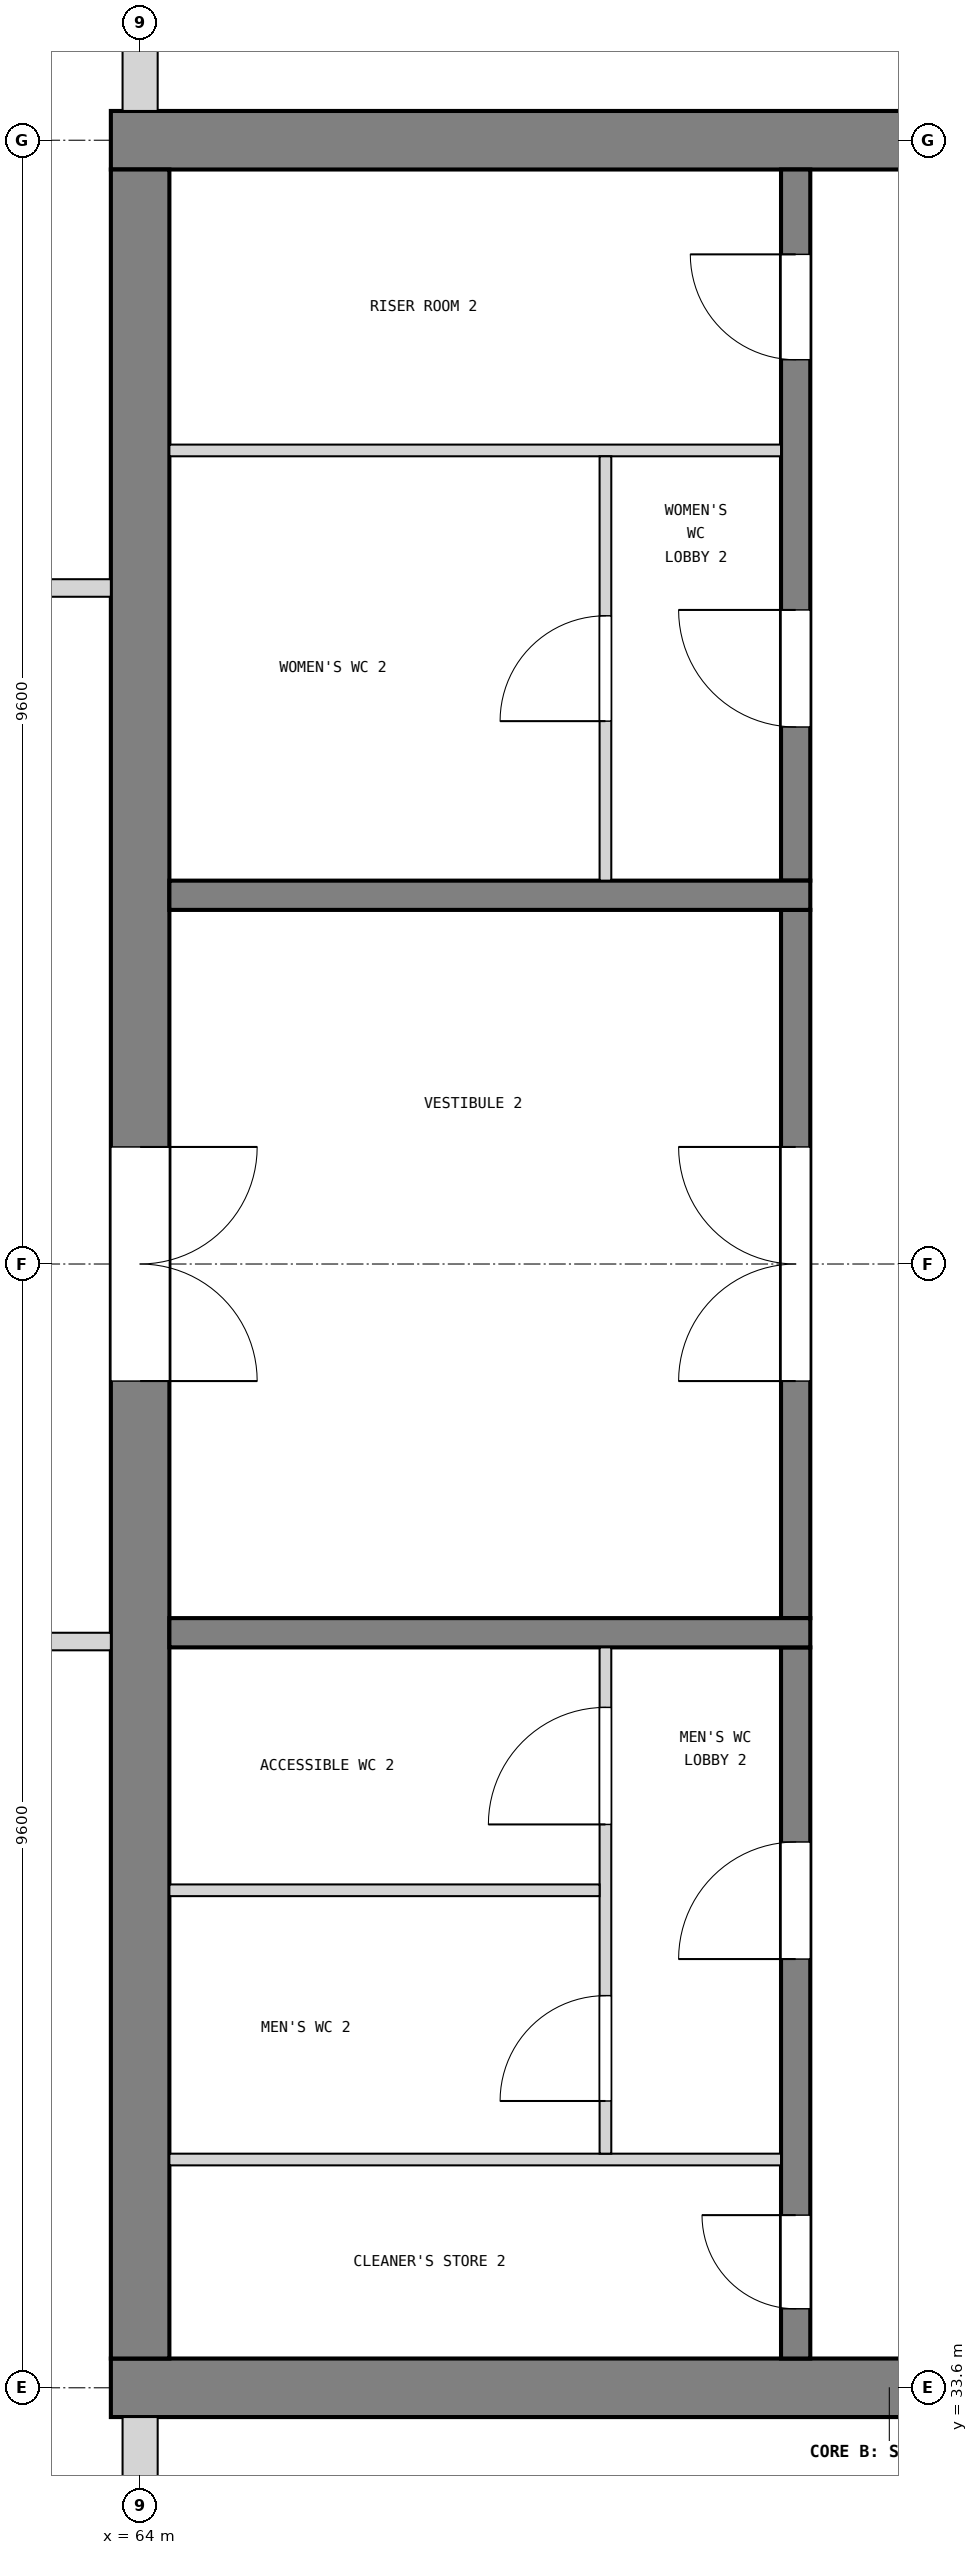
"""IFC4 building model, lengths in metres.
Left out: names, types, materials, properties, quantities, classifications, styles, units other than length and angle.
Written with IfcOpenShell. Run it as: python <this file> out.ifc"""

import sys

from ifc_helpers import new_model, si_unit, direction, frame, frame_2d, origin, place, context, subcontext, project, spatial, rectangle, extrude, element, fill, save


model = new_model("IFC4")
c1 = context("Model", 3, precision=1e-05, world=origin(), true_north=direction((0.0, 1.0)))
c2 = subcontext(c1, "Body", "Model", "MODEL_VIEW")
j1 = project(units=[si_unit("LENGTHUNIT", "METRE"), si_unit("PLANEANGLEUNIT", "RADIAN")], contexts=[c1])
p1 = place(None, origin())
s1 = spatial("IfcSite", under=j1, at=p1, CompositionType="ELEMENT")
p2 = place(p1, origin())
s2 = spatial("IfcBuilding", under=s1, at=p2, CompositionType="ELEMENT")
p3 = place(p2, frame((0.0, 0.0, 44.4)))
s3 = spatial("IfcBuildingStorey", under=s2, at=p3, CompositionType="ELEMENT", Elevation=44.4)
p4 = place(p3, frame((63.75, 52.8, 0.0), z_axis=(0.0, 0.0, 1.0), x_axis=(1.0, 0.0, 0.0)))
e1 = element("IfcWall", 1, at=p4, inside=s3, PredefinedType="SHEAR", context=c2, shape_type="SweptSolid", body=[
    extrude(rectangle(XDim=13.3, YDim=0.5, at=frame_2d((6.65, 0.0))), origin(), (0.0, 0.0, 1.0), 3.9),
])
p5 = place(p4, frame((11.05, 0.0, 1.0)))
e2 = element("IfcOpeningElement", 2, at=p5, cuts=e1, PredefinedType="OPENING", context=c2, shape_type="SweptSolid", body=[
    extrude(rectangle(XDim=0.4, YDim=2.0, at=frame_2d((0.2, 1.0))), frame((0.0, 0.26, 0.0), z_axis=(0.0, -1.0, 0.0), x_axis=(1.0, 0.0, 0.0)), (0.0, 0.0, 1.0), 0.52),
])
p6 = place(p3, frame((63.75, 33.6, 0.0), z_axis=(0.0, 0.0, 1.0), x_axis=(1.0, 0.0, 0.0)))
e3 = element("IfcWall", 3, at=p6, inside=s3, PredefinedType="SHEAR", context=c2, shape_type="SweptSolid", body=[
    extrude(rectangle(XDim=13.3, YDim=0.5, at=frame_2d((6.65, 0.0))), origin(), (0.0, 0.0, 1.0), 3.9),
])
p7 = place(p6, frame((11.05, 0.0, 1.0)))
e4 = element("IfcOpeningElement", 4, at=p7, cuts=e3, PredefinedType="OPENING", context=c2, shape_type="SweptSolid", body=[
    extrude(rectangle(XDim=0.4, YDim=2.0, at=frame_2d((0.2, 1.0))), frame((0.0, 0.26, 0.0), z_axis=(0.0, -1.0, 0.0), x_axis=(1.0, 0.0, 0.0)), (0.0, 0.0, 1.0), 0.52),
])
p8 = place(p3, frame((64.0, 33.85, 0.0), z_axis=(0.0, 0.0, 1.0), x_axis=(0.0, 1.0, 0.0)))
e5 = element("IfcWall", 5, at=p8, inside=s3, PredefinedType="SHEAR", context=c2, shape_type="SweptSolid", body=[
    extrude(rectangle(XDim=18.7, YDim=0.5, at=frame_2d((9.35, 0.0))), origin(), (0.0, 0.0, 1.0), 3.9),
])
p9 = place(p8, frame((8.35, 0.0, 0.0)))
e6 = element("IfcOpeningElement", 6, at=p9, cuts=e5, PredefinedType="OPENING", context=c2, shape_type="SweptSolid", body=[
    extrude(rectangle(XDim=2.0, YDim=2.1, at=frame_2d((1.0, 1.05))), frame((0.0, 0.26, 0.0), z_axis=(0.0, -1.0, 0.0), x_axis=(1.0, 0.0, 0.0)), (0.0, 0.0, 1.0), 0.52),
])
p10 = place(p3, frame((64.0, 31.0, 0.0), z_axis=(0.0, 0.0, 1.0), x_axis=(0.0, 1.0, 0.0)))
e7 = element("IfcWall", 7, at=p10, inside=s3, PredefinedType="SOLIDWALL", context=c2, shape_type="SweptSolid", body=[
    extrude(rectangle(XDim=2.35, YDim=0.3, at=frame_2d((1.175, 0.0))), origin(), (0.0, 0.0, 1.0), 2.88),
])
p11 = place(p3, frame((64.0, 53.05, 0.0), z_axis=(0.0, 0.0, 1.0), x_axis=(0.0, 1.0, 0.0)))
e8 = element("IfcWall", 8, at=p11, inside=s3, PredefinedType="SOLIDWALL", context=c2, shape_type="SweptSolid", body=[
    extrude(rectangle(XDim=2.35, YDim=0.3, at=frame_2d((1.175, 0.0))), origin(), (0.0, 0.0, 1.0), 2.88),
])
p12 = place(p3, frame((69.6, 33.85, 0.0), z_axis=(0.0, 0.0, 1.0), x_axis=(0.0, 1.0, 0.0)))
e9 = element("IfcWall", 9, at=p12, inside=s3, PredefinedType="SOLIDWALL", context=c2, shape_type="SweptSolid", body=[
    extrude(rectangle(XDim=6.075, YDim=0.25, at=frame_2d((3.038, 0.0))), origin(), (0.0, 0.0, 1.0), 3.6),
])
p13 = place(p12, frame((0.425, 0.0, 0.0)))
e10 = element("IfcOpeningElement", 10, at=p13, cuts=e9, PredefinedType="OPENING", context=c2, shape_type="SweptSolid", body=[
    extrude(rectangle(XDim=0.8, YDim=2.1, at=frame_2d((0.4, 1.05))), frame((0.0, 0.135, 0.0), z_axis=(0.0, -1.0, 0.0), x_axis=(1.0, 0.0, 0.0)), (0.0, 0.0, 1.0), 0.27),
])
p14 = place(p12, frame((3.413, 0.0, 0.0)))
e11 = element("IfcOpeningElement", 11, at=p14, cuts=e9, PredefinedType="OPENING", context=c2, shape_type="SweptSolid", body=[
    extrude(rectangle(XDim=1.0, YDim=2.1, at=frame_2d((0.5, 1.05))), frame((0.0, 0.135, 0.0), z_axis=(0.0, -1.0, 0.0), x_axis=(1.0, 0.0, 0.0)), (0.0, 0.0, 1.0), 0.27),
])
p15 = place(p3, frame((69.6, 40.175, 0.0), z_axis=(0.0, 0.0, 1.0), x_axis=(0.0, 1.0, 0.0)))
e12 = element("IfcWall", 12, at=p15, inside=s3, PredefinedType="SOLIDWALL", context=c2, shape_type="SweptSolid", body=[
    extrude(rectangle(XDim=6.05, YDim=0.25, at=frame_2d((3.025, 0.0))), origin(), (0.0, 0.0, 1.0), 3.6),
])
p16 = place(p15, frame((2.025, 0.0, 0.0)))
e13 = element("IfcOpeningElement", 13, at=p16, cuts=e12, PredefinedType="OPENING", context=c2, shape_type="SweptSolid", body=[
    extrude(rectangle(XDim=2.0, YDim=2.1, at=frame_2d((1.0, 1.05))), frame((0.0, 0.135, 0.0), z_axis=(0.0, -1.0, 0.0), x_axis=(1.0, 0.0, 0.0)), (0.0, 0.0, 1.0), 0.27),
])
p17 = place(p3, frame((69.6, 46.475, 0.0), z_axis=(0.0, 0.0, 1.0), x_axis=(0.0, 1.0, 0.0)))
e14 = element("IfcWall", 14, at=p17, inside=s3, PredefinedType="SOLIDWALL", context=c2, shape_type="SweptSolid", body=[
    extrude(rectangle(XDim=6.075, YDim=0.25, at=frame_2d((3.038, 0.0))), origin(), (0.0, 0.0, 1.0), 3.6),
])
p18 = place(p17, frame((1.312, 0.0, 0.0)))
e15 = element("IfcOpeningElement", 15, at=p18, cuts=e14, PredefinedType="OPENING", context=c2, shape_type="SweptSolid", body=[
    extrude(rectangle(XDim=1.0, YDim=2.1, at=frame_2d((0.5, 1.05))), frame((0.0, 0.135, 0.0), z_axis=(0.0, -1.0, 0.0), x_axis=(1.0, 0.0, 0.0)), (0.0, 0.0, 1.0), 0.27),
])
p19 = place(p17, frame((4.45, 0.0, 0.0)))
e16 = element("IfcOpeningElement", 16, at=p19, cuts=e14, PredefinedType="OPENING", context=c2, shape_type="SweptSolid", body=[
    extrude(rectangle(XDim=0.9, YDim=2.1, at=frame_2d((0.45, 1.05))), frame((0.0, 0.135, 0.0), z_axis=(0.0, -1.0, 0.0), x_axis=(1.0, 0.0, 0.0)), (0.0, 0.0, 1.0), 0.27),
])
for number, where, z_axis, x_axis in (
    (17, (69.725, 40.05, 0.0), (0.0, 0.0, 1.0), (-1.0, 0.0, 0.0)),
    (18, (69.725, 46.35, 0.0), (0.0, 0.0, 1.0), (-1.0, 0.0, 0.0)),
):
    element("IfcWall", number, at=place(p3, frame(where, z_axis=z_axis, x_axis=x_axis)), inside=s3, PredefinedType="SOLIDWALL", context=c2, shape_type="SweptSolid", body=[
        extrude(rectangle(XDim=5.475, YDim=0.25, at=frame_2d((2.738, 0.0))), origin(), (0.0, 0.0, 1.0), 3.6),
    ])
p20 = place(p3, frame((69.475, 35.55, 0.0), z_axis=(0.0, 0.0, 1.0), x_axis=(-1.0, 0.0, 0.0)))
e19 = element("IfcWall", 19, at=p20, inside=s3, PredefinedType="PARTITIONING", context=c2, shape_type="SweptSolid", body=[
    extrude(rectangle(XDim=5.225, YDim=0.1, at=frame_2d((2.613, 0.0))), origin(), (0.0, 0.0, 1.0), 3.6),
])
p21 = place(p3, frame((67.975, 35.6, 0.0), z_axis=(0.0, 0.0, 1.0), x_axis=(0.0, 1.0, 0.0)))
e20 = element("IfcWall", 20, at=p21, inside=s3, PredefinedType="PARTITIONING", context=c2, shape_type="SweptSolid", body=[
    extrude(rectangle(XDim=4.325, YDim=0.1, at=frame_2d((2.163, 0.0))), origin(), (0.0, 0.0, 1.0), 3.6),
])
p22 = place(p21, frame((0.45, 0.0, 0.0)))
e21 = element("IfcOpeningElement", 21, at=p22, cuts=e20, PredefinedType="OPENING", context=c2, shape_type="SweptSolid", body=[
    extrude(rectangle(XDim=0.9, YDim=2.1, at=frame_2d((0.45, 1.05))), frame((0.0, 0.06, 0.0), z_axis=(0.0, -1.0, 0.0), x_axis=(1.0, 0.0, 0.0)), (0.0, 0.0, 1.0), 0.12),
])
p23 = place(p21, frame((2.812, 0.0, 0.0)))
e22 = element("IfcOpeningElement", 22, at=p23, cuts=e20, PredefinedType="OPENING", context=c2, shape_type="SweptSolid", body=[
    extrude(rectangle(XDim=1.0, YDim=2.1, at=frame_2d((0.5, 1.05))), frame((0.0, 0.06, 0.0), z_axis=(0.0, -1.0, 0.0), x_axis=(1.0, 0.0, 0.0)), (0.0, 0.0, 1.0), 0.12),
])
p24 = place(p3, frame((67.925, 37.85, 0.0), z_axis=(0.0, 0.0, 1.0), x_axis=(-1.0, 0.0, 0.0)))
e23 = element("IfcWall", 23, at=p24, inside=s3, PredefinedType="PARTITIONING", context=c2, shape_type="SweptSolid", body=[
    extrude(rectangle(XDim=3.675, YDim=0.1, at=frame_2d((1.837, 0.0))), origin(), (0.0, 0.0, 1.0), 3.6),
])
p25 = place(p3, frame((69.475, 50.15, 0.0), z_axis=(0.0, 0.0, 1.0), x_axis=(-1.0, 0.0, 0.0)))
e24 = element("IfcWall", 24, at=p25, inside=s3, PredefinedType="PARTITIONING", context=c2, shape_type="SweptSolid", body=[
    extrude(rectangle(XDim=5.225, YDim=0.1, at=frame_2d((2.613, 0.0))), origin(), (0.0, 0.0, 1.0), 3.6),
])
p26 = place(p3, frame((67.975, 46.475, 0.0), z_axis=(0.0, 0.0, 1.0), x_axis=(0.0, 1.0, 0.0)))
e25 = element("IfcWall", 25, at=p26, inside=s3, PredefinedType="PARTITIONING", context=c2, shape_type="SweptSolid", body=[
    extrude(rectangle(XDim=3.625, YDim=0.1, at=frame_2d((1.812, 0.0))), origin(), (0.0, 0.0, 1.0), 3.6),
])
p27 = place(p26, frame((1.363, 0.0, 0.0)))
e26 = element("IfcOpeningElement", 26, at=p27, cuts=e25, PredefinedType="OPENING", context=c2, shape_type="SweptSolid", body=[
    extrude(rectangle(XDim=0.9, YDim=2.1, at=frame_2d((0.45, 1.05))), frame((0.0, 0.06, 0.0), z_axis=(0.0, -1.0, 0.0), x_axis=(1.0, 0.0, 0.0)), (0.0, 0.0, 1.0), 0.12),
])
p28 = place(p3, frame((57.78, 48.975, 0.0), z_axis=(0.0, 0.0, 1.0), x_axis=(1.0, 0.0, 0.0)))
e27 = element("IfcWall", 27, at=p28, inside=s3, PredefinedType="PARTITIONING", context=c2, shape_type="SweptSolid", body=[
    extrude(rectangle(XDim=5.97, YDim=0.15, at=frame_2d((2.985, 0.0))), origin(), (0.0, 0.0, 1.0), 3.68),
])
p29 = place(p28, frame((2.52, 0.0, 0.0)))
e28 = element("IfcOpeningElement", 28, at=p29, cuts=e27, PredefinedType="OPENING", context=c2, shape_type="SweptSolid", body=[
    extrude(rectangle(XDim=1.0, YDim=2.1, at=frame_2d((0.5, 1.05))), frame((0.0, 0.085, 0.0), z_axis=(0.0, -1.0, 0.0), x_axis=(1.0, 0.0, 0.0)), (0.0, 0.0, 1.0), 0.17),
])
p30 = place(p3, frame((57.78, 39.975, 0.0), z_axis=(0.0, 0.0, 1.0), x_axis=(1.0, 0.0, 0.0)))
e29 = element("IfcWall", 29, at=p30, inside=s3, PredefinedType="PARTITIONING", context=c2, shape_type="SweptSolid", body=[
    extrude(rectangle(XDim=5.97, YDim=0.15, at=frame_2d((2.985, 0.0))), origin(), (0.0, 0.0, 1.0), 3.68),
])
p31 = place(p30, frame((2.52, 0.0, 0.0)))
e30 = element("IfcOpeningElement", 30, at=p31, cuts=e29, PredefinedType="OPENING", context=c2, shape_type="SweptSolid", body=[
    extrude(rectangle(XDim=1.0, YDim=2.1, at=frame_2d((0.5, 1.05))), frame((0.0, 0.085, 0.0), z_axis=(0.0, -1.0, 0.0), x_axis=(1.0, 0.0, 0.0)), (0.0, 0.0, 1.0), 0.17),
])
p32 = place(p16, origin())
e31 = element("IfcDoor", 31, at=p32, inside=s3, OperationType="DOUBLE_DOOR_SINGLE_SWING", PredefinedType="DOOR", context=c2, shape_type="SweptSolid", body=[
    extrude(rectangle(XDim=2.0, YDim=2.1, at=frame_2d((1.0, 1.05))), frame((0.0, 0.025, 0.0), z_axis=(0.0, -1.0, 0.0), x_axis=(1.0, 0.0, 0.0)), (0.0, 0.0, 1.0), 0.05),
])
fill(e13, e31)
p33 = place(p9, frame((2.0, 0.0, 0.0), z_axis=(0.0, 0.0, 1.0), x_axis=(-1.0, 0.0, 0.0)))
e32 = element("IfcDoor", 32, at=p33, inside=s3, OperationType="DOUBLE_DOOR_SINGLE_SWING", PredefinedType="DOOR", context=c2, shape_type="SweptSolid", body=[
    extrude(rectangle(XDim=2.0, YDim=2.1, at=frame_2d((1.0, 1.05))), frame((0.0, 0.025, 0.0), z_axis=(0.0, -1.0, 0.0), x_axis=(1.0, 0.0, 0.0)), (0.0, 0.0, 1.0), 0.05),
])
fill(e6, e32)
p34 = place(p13, origin())
e33 = element("IfcDoor", 33, at=p34, inside=s3, OperationType="SINGLE_SWING_RIGHT", PredefinedType="DOOR", context=c2, shape_type="SweptSolid", body=[
    extrude(rectangle(XDim=0.8, YDim=2.1, at=frame_2d((0.4, 1.05))), frame((0.0, 0.025, 0.0), z_axis=(0.0, -1.0, 0.0), x_axis=(1.0, 0.0, 0.0)), (0.0, 0.0, 1.0), 0.05),
])
fill(e10, e33)
p35 = place(p14, origin())
e34 = element("IfcDoor", 34, at=p35, inside=s3, OperationType="SINGLE_SWING_LEFT", PredefinedType="DOOR", context=c2, shape_type="SweptSolid", body=[
    extrude(rectangle(XDim=1.0, YDim=2.1, at=frame_2d((0.5, 1.05))), frame((0.0, 0.025, 0.0), z_axis=(0.0, -1.0, 0.0), x_axis=(1.0, 0.0, 0.0)), (0.0, 0.0, 1.0), 0.05),
])
fill(e11, e34)
p36 = place(p22, origin())
e35 = element("IfcDoor", 35, at=p36, inside=s3, OperationType="SINGLE_SWING_LEFT", PredefinedType="DOOR", context=c2, shape_type="SweptSolid", body=[
    extrude(rectangle(XDim=0.9, YDim=2.1, at=frame_2d((0.45, 1.05))), frame((0.0, 0.025, 0.0), z_axis=(0.0, -1.0, 0.0), x_axis=(1.0, 0.0, 0.0)), (0.0, 0.0, 1.0), 0.05),
])
fill(e21, e35)
p37 = place(p23, origin())
e36 = element("IfcDoor", 36, at=p37, inside=s3, OperationType="SINGLE_SWING_LEFT", PredefinedType="DOOR", context=c2, shape_type="SweptSolid", body=[
    extrude(rectangle(XDim=1.0, YDim=2.1, at=frame_2d((0.5, 1.05))), frame((0.0, 0.025, 0.0), z_axis=(0.0, -1.0, 0.0), x_axis=(1.0, 0.0, 0.0)), (0.0, 0.0, 1.0), 0.05),
])
fill(e22, e36)
p38 = place(p18, origin())
e37 = element("IfcDoor", 37, at=p38, inside=s3, OperationType="SINGLE_SWING_RIGHT", PredefinedType="DOOR", context=c2, shape_type="SweptSolid", body=[
    extrude(rectangle(XDim=1.0, YDim=2.1, at=frame_2d((0.5, 1.05))), frame((0.0, 0.025, 0.0), z_axis=(0.0, -1.0, 0.0), x_axis=(1.0, 0.0, 0.0)), (0.0, 0.0, 1.0), 0.05),
])
fill(e15, e37)
p39 = place(p27, origin())
e38 = element("IfcDoor", 38, at=p39, inside=s3, OperationType="SINGLE_SWING_LEFT", PredefinedType="DOOR", context=c2, shape_type="SweptSolid", body=[
    extrude(rectangle(XDim=0.9, YDim=2.1, at=frame_2d((0.45, 1.05))), frame((0.0, 0.025, 0.0), z_axis=(0.0, -1.0, 0.0), x_axis=(1.0, 0.0, 0.0)), (0.0, 0.0, 1.0), 0.05),
])
fill(e26, e38)
p40 = place(p19, origin())
e39 = element("IfcDoor", 39, at=p40, inside=s3, OperationType="SINGLE_SWING_RIGHT", PredefinedType="DOOR", context=c2, shape_type="SweptSolid", body=[
    extrude(rectangle(XDim=0.9, YDim=2.1, at=frame_2d((0.45, 1.05))), frame((0.0, 0.025, 0.0), z_axis=(0.0, -1.0, 0.0), x_axis=(1.0, 0.0, 0.0)), (0.0, 0.0, 1.0), 0.05),
])
fill(e16, e39)
save(model, sys.argv[1])
